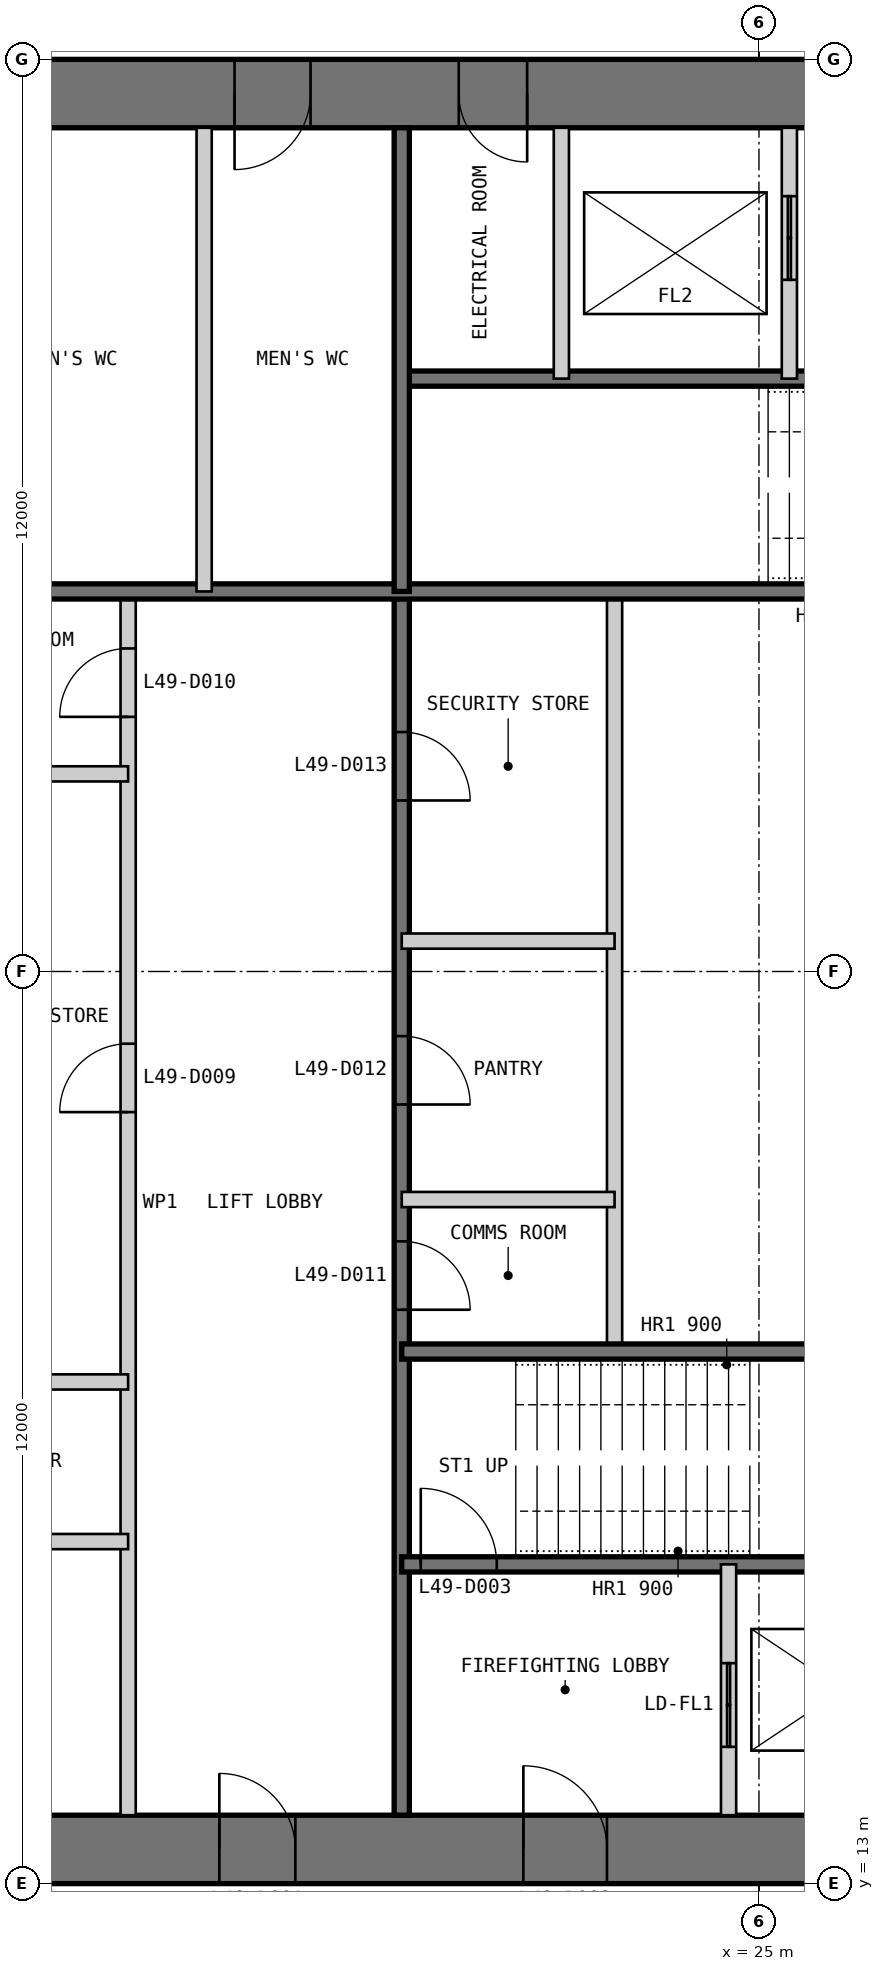
"""IFC4 building model, lengths in metres.
Left out: names, types, materials, properties, quantities, classifications, styles, units other than length and angle.
Written with IfcOpenShell. Run it as: python <this file> out.ifc"""

import sys

from ifc_helpers import new_model, si_unit, direction, frame, frame_2d, origin, place, context, subcontext, project, spatial, polyline, rectangle, outline, extrude, element, fill, save


model = new_model("IFC4")
c1 = context("Model", 3, precision=1e-05, world=origin(), true_north=direction((0.0, 1.0)))
c2 = subcontext(c1, "Body", "Model", "MODEL_VIEW")
j1 = project(units=[si_unit("LENGTHUNIT", "METRE"), si_unit("PLANEANGLEUNIT", "RADIAN")], contexts=[c1])
p1 = place(None, origin())
s1 = spatial("IfcSite", under=j1, at=p1, CompositionType="ELEMENT")
p2 = place(p1, origin())
s2 = spatial("IfcBuilding", under=s1, at=p2, CompositionType="ELEMENT")
p3 = place(p2, frame((0.0, 0.0, 209.8)))
s3 = spatial("IfcBuildingStorey", under=s2, at=p3, CompositionType="ELEMENT", Elevation=209.8)
p4 = place(p3, frame((13.0, 13.45, 0.0), z_axis=(0.0, 0.0, 1.0), x_axis=(1.0, 0.0, 0.0)))
e1 = element("IfcWall", 1, at=p4, inside=s3, PredefinedType="SHEAR", context=c2, shape_type="SweptSolid", body=[
    extrude(outline(polyline([(0.0, -0.45), (24.0, -0.45), (23.1, 0.45), (0.9, 0.45), (0.0, -0.45)])), origin(), (0.0, 0.0, 1.0), 4.0),
])
p5 = place(p4, frame((4.9, 0.0, 0.0)))
e2 = element("IfcOpeningElement", 2, at=p5, cuts=e1, PredefinedType="OPENING", context=c2, shape_type="SweptSolid", body=[
    extrude(rectangle(XDim=1.0, YDim=2.2, at=frame_2d((0.5, 1.1))), frame((0.0, 0.46, 0.0), z_axis=(0.0, -1.0, 0.0), x_axis=(1.0, 0.0, 0.0)), (0.0, 0.0, 1.0), 0.92),
])
p6 = place(p4, frame((8.9, 0.0, 0.0)))
e3 = element("IfcOpeningElement", 3, at=p6, cuts=e1, PredefinedType="OPENING", context=c2, shape_type="SweptSolid", body=[
    extrude(rectangle(XDim=1.1, YDim=2.2, at=frame_2d((0.55, 1.1))), frame((0.0, 0.46, 0.0), z_axis=(0.0, -1.0, 0.0), x_axis=(1.0, 0.0, 0.0)), (0.0, 0.0, 1.0), 0.92),
])
p7 = place(p4, frame((15.05, 0.0, 0.0)))
e4 = element("IfcOpeningElement", 4, at=p7, cuts=e1, PredefinedType="OPENING", context=c2, shape_type="SweptSolid", body=[
    extrude(rectangle(XDim=0.9, YDim=2.2, at=frame_2d((0.45, 1.1))), frame((0.0, 0.46, 0.0), z_axis=(0.0, -1.0, 0.0), x_axis=(1.0, 0.0, 0.0)), (0.0, 0.0, 1.0), 0.92),
])
p8 = place(p4, frame((17.9, 0.0, 0.0)))
e5 = element("IfcOpeningElement", 5, at=p8, cuts=e1, PredefinedType="OPENING", context=c2, shape_type="SweptSolid", body=[
    extrude(rectangle(XDim=1.0, YDim=2.2, at=frame_2d((0.5, 1.1))), frame((0.0, 0.46, 0.0), z_axis=(0.0, -1.0, 0.0), x_axis=(1.0, 0.0, 0.0)), (0.0, 0.0, 1.0), 0.92),
])
p9 = place(p4, frame((21.4, 0.0, 0.0)))
e6 = element("IfcOpeningElement", 6, at=p9, cuts=e1, PredefinedType="OPENING", context=c2, shape_type="SweptSolid", body=[
    extrude(rectangle(XDim=1.0, YDim=2.2, at=frame_2d((0.5, 1.1))), frame((0.0, 0.46, 0.0), z_axis=(0.0, -1.0, 0.0), x_axis=(1.0, 0.0, 0.0)), (0.0, 0.0, 1.0), 0.92),
])
p10 = place(p3, frame((37.0, 36.55, 0.0), z_axis=(0.0, 0.0, 1.0), x_axis=(-1.0, 0.0, 0.0)))
e7 = element("IfcWall", 7, at=p10, inside=s3, PredefinedType="SHEAR", context=c2, shape_type="SweptSolid", body=[
    extrude(outline(polyline([(0.0, -0.45), (24.0, -0.45), (23.1, 0.45), (0.9, 0.45), (0.0, -0.45)])), origin(), (0.0, 0.0, 1.0), 4.0),
])
p11 = place(p10, frame((4.9, 0.0, 0.0)))
e8 = element("IfcOpeningElement", 8, at=p11, cuts=e7, PredefinedType="OPENING", context=c2, shape_type="SweptSolid", body=[
    extrude(rectangle(XDim=1.0, YDim=2.2, at=frame_2d((0.5, 1.1))), frame((0.0, 0.46, 0.0), z_axis=(0.0, -1.0, 0.0), x_axis=(1.0, 0.0, 0.0)), (0.0, 0.0, 1.0), 0.92),
])
p12 = place(p10, frame((8.9, 0.0, 0.0)))
e9 = element("IfcOpeningElement", 9, at=p12, cuts=e7, PredefinedType="OPENING", context=c2, shape_type="SweptSolid", body=[
    extrude(rectangle(XDim=1.1, YDim=2.2, at=frame_2d((0.55, 1.1))), frame((0.0, 0.46, 0.0), z_axis=(0.0, -1.0, 0.0), x_axis=(1.0, 0.0, 0.0)), (0.0, 0.0, 1.0), 0.92),
])
p13 = place(p10, frame((15.05, 0.0, 0.0)))
e10 = element("IfcOpeningElement", 10, at=p13, cuts=e7, PredefinedType="OPENING", context=c2, shape_type="SweptSolid", body=[
    extrude(rectangle(XDim=0.9, YDim=2.2, at=frame_2d((0.45, 1.1))), frame((0.0, 0.46, 0.0), z_axis=(0.0, -1.0, 0.0), x_axis=(1.0, 0.0, 0.0)), (0.0, 0.0, 1.0), 0.92),
])
p14 = place(p10, frame((17.9, 0.0, 0.0)))
e11 = element("IfcOpeningElement", 11, at=p14, cuts=e7, PredefinedType="OPENING", context=c2, shape_type="SweptSolid", body=[
    extrude(rectangle(XDim=1.0, YDim=2.2, at=frame_2d((0.5, 1.1))), frame((0.0, 0.46, 0.0), z_axis=(0.0, -1.0, 0.0), x_axis=(1.0, 0.0, 0.0)), (0.0, 0.0, 1.0), 0.92),
])
p15 = place(p10, frame((21.4, 0.0, 0.0)))
e12 = element("IfcOpeningElement", 12, at=p15, cuts=e7, PredefinedType="OPENING", context=c2, shape_type="SweptSolid", body=[
    extrude(rectangle(XDim=1.0, YDim=2.2, at=frame_2d((0.5, 1.1))), frame((0.0, 0.46, 0.0), z_axis=(0.0, -1.0, 0.0), x_axis=(1.0, 0.0, 0.0)), (0.0, 0.0, 1.0), 0.92),
])
p16 = place(p3, frame((16.7, 13.9, 0.0), z_axis=(0.0, 0.0, 1.0), x_axis=(0.0, 1.0, 0.0)))
e13 = element("IfcWall", 13, at=p16, inside=s3, PredefinedType="PARTITIONING", context=c2, shape_type="SweptSolid", body=[
    extrude(rectangle(XDim=16.1, YDim=0.2, at=frame_2d((8.05, 0.0))), origin(), (0.0, 0.0, 1.0), 3.8),
])
p17 = place(p16, frame((9.25, 0.0, 0.0)))
e14 = element("IfcOpeningElement", 14, at=p17, cuts=e13, PredefinedType="OPENING", context=c2, shape_type="SweptSolid", body=[
    extrude(rectangle(XDim=0.9, YDim=2.2, at=frame_2d((0.45, 1.1))), frame((0.0, 0.11, 0.0), z_axis=(0.0, -1.0, 0.0), x_axis=(1.0, 0.0, 0.0)), (0.0, 0.0, 1.0), 0.22),
])
p18 = place(p16, frame((14.45, 0.0, 0.0)))
e15 = element("IfcOpeningElement", 15, at=p18, cuts=e13, PredefinedType="OPENING", context=c2, shape_type="SweptSolid", body=[
    extrude(rectangle(XDim=0.9, YDim=2.2, at=frame_2d((0.45, 1.1))), frame((0.0, 0.11, 0.0), z_axis=(0.0, -1.0, 0.0), x_axis=(1.0, 0.0, 0.0)), (0.0, 0.0, 1.0), 0.22),
])
p19 = place(p3, frame((20.3, 13.9, 0.0), z_axis=(0.0, 0.0, 1.0), x_axis=(0.0, 1.0, 0.0)))
e16 = element("IfcWall", 16, at=p19, inside=s3, PredefinedType="SOLIDWALL", context=c2, shape_type="SweptSolid", body=[
    extrude(rectangle(XDim=16.1, YDim=0.2, at=frame_2d((8.05, 0.0))), origin(), (0.0, 0.0, 1.0), 3.8),
])
p20 = place(p19, frame((6.65, 0.0, 0.0)))
e17 = element("IfcOpeningElement", 17, at=p20, cuts=e16, PredefinedType="OPENING", context=c2, shape_type="SweptSolid", body=[
    extrude(rectangle(XDim=0.9, YDim=2.2, at=frame_2d((0.45, 1.1))), frame((0.0, 0.11, 0.0), z_axis=(0.0, -1.0, 0.0), x_axis=(1.0, 0.0, 0.0)), (0.0, 0.0, 1.0), 0.22),
])
p21 = place(p19, frame((9.35, 0.0, 0.0)))
e18 = element("IfcOpeningElement", 18, at=p21, cuts=e16, PredefinedType="OPENING", context=c2, shape_type="SweptSolid", body=[
    extrude(rectangle(XDim=0.9, YDim=2.2, at=frame_2d((0.45, 1.1))), frame((0.0, 0.11, 0.0), z_axis=(0.0, -1.0, 0.0), x_axis=(1.0, 0.0, 0.0)), (0.0, 0.0, 1.0), 0.22),
])
p22 = place(p19, frame((13.35, 0.0, 0.0)))
e19 = element("IfcOpeningElement", 19, at=p22, cuts=e16, PredefinedType="OPENING", context=c2, shape_type="SweptSolid", body=[
    extrude(rectangle(XDim=0.9, YDim=2.2, at=frame_2d((0.45, 1.1))), frame((0.0, 0.11, 0.0), z_axis=(0.0, -1.0, 0.0), x_axis=(1.0, 0.0, 0.0)), (0.0, 0.0, 1.0), 0.22),
])
p23 = place(p3, frame((23.1, 20.0, 0.0), z_axis=(0.0, 0.0, 1.0), x_axis=(0.0, 1.0, 0.0)))
e20 = element("IfcWall", 20, at=p23, inside=s3, PredefinedType="PARTITIONING", context=c2, shape_type="SweptSolid", body=[
    extrude(rectangle(XDim=10.0, YDim=0.2, at=frame_2d((5.0, 0.0))), origin(), (0.0, 0.0, 1.0), 3.8),
])
p24 = place(p3, frame((20.3, 17.2, 0.0), z_axis=(0.0, 0.0, 1.0), x_axis=(1.0, 0.0, 0.0)))
e21 = element("IfcWall", 21, at=p24, inside=s3, PredefinedType="SOLIDWALL", context=c2, shape_type="SweptSolid", body=[
    extrude(rectangle(XDim=9.4, YDim=0.2, at=frame_2d((4.7, 0.0))), origin(), (0.0, 0.0, 1.0), 3.8),
])
p25 = place(p24, frame((0.25, 0.0, 0.0)))
e22 = element("IfcOpeningElement", 22, at=p25, cuts=e21, PredefinedType="OPENING", context=c2, shape_type="SweptSolid", body=[
    extrude(rectangle(XDim=1.0, YDim=2.2, at=frame_2d((0.5, 1.1))), frame((0.0, 0.11, 0.0), z_axis=(0.0, -1.0, 0.0), x_axis=(1.0, 0.0, 0.0)), (0.0, 0.0, 1.0), 0.22),
])
p26 = place(p3, frame((20.3, 20.0, 0.0), z_axis=(0.0, 0.0, 1.0), x_axis=(1.0, 0.0, 0.0)))
e23 = element("IfcWall", 23, at=p26, inside=s3, PredefinedType="SOLIDWALL", context=c2, shape_type="SweptSolid", body=[
    extrude(rectangle(XDim=15.8, YDim=0.2, at=frame_2d((7.9, 0.0))), origin(), (0.0, 0.0, 1.0), 3.8),
])
p27 = place(p3, frame((24.6, 13.9, 0.0), z_axis=(0.0, 0.0, 1.0), x_axis=(0.0, 1.0, 0.0)))
e24 = element("IfcWall", 24, at=p27, inside=s3, PredefinedType="PARTITIONING", context=c2, shape_type="SweptSolid", body=[
    extrude(rectangle(XDim=3.3, YDim=0.2, at=frame_2d((1.65, 0.0))), origin(), (0.0, 0.0, 1.0), 3.8),
])
p28 = place(p27, frame((0.9, 0.0, 0.0)))
e25 = element("IfcOpeningElement", 25, at=p28, cuts=e24, PredefinedType="OPENING", context=c2, shape_type="SweptSolid", body=[
    extrude(rectangle(XDim=1.1, YDim=2.2, at=frame_2d((0.55, 1.1))), frame((0.0, 0.11, 0.0), z_axis=(0.0, -1.0, 0.0), x_axis=(1.0, 0.0, 0.0)), (0.0, 0.0, 1.0), 0.22),
])
for number, where, z_axis, x_axis in (
    (26, (13.9, 17.5, 0.0), (0.0, 0.0, 1.0), (1.0, 0.0, 0.0)),
    (27, (13.9, 19.6, 0.0), (0.0, 0.0, 1.0), (1.0, 0.0, 0.0)),
    (28, (13.9, 27.6, 0.0), (0.0, 0.0, 1.0), (1.0, 0.0, 0.0)),
    (29, (20.3, 22.0, 0.0), (0.0, 0.0, 1.0), (1.0, 0.0, 0.0)),
    (30, (20.3, 25.4, 0.0), (0.0, 0.0, 1.0), (1.0, 0.0, 0.0)),
):
    element("IfcWall", number, at=place(p3, frame(where, z_axis=z_axis, x_axis=x_axis)), inside=s3, PredefinedType="PARTITIONING", context=c2, shape_type="SweptSolid", body=[
        extrude(rectangle(XDim=2.8, YDim=0.2, at=frame_2d((1.4, 0.0))), origin(), (0.0, 0.0, 1.0), 3.8),
    ])
p29 = place(p3, frame((29.7, 32.8, 0.0), z_axis=(0.0, 0.0, 1.0), x_axis=(-1.0, 0.0, 0.0)))
e31 = element("IfcWall", 31, at=p29, inside=s3, PredefinedType="SOLIDWALL", context=c2, shape_type="SweptSolid", body=[
    extrude(rectangle(XDim=9.4, YDim=0.2, at=frame_2d((4.7, 0.0))), origin(), (0.0, 0.0, 1.0), 3.8),
])
p30 = place(p29, frame((0.25, 0.0, 0.0)))
e32 = element("IfcOpeningElement", 32, at=p30, cuts=e31, PredefinedType="OPENING", context=c2, shape_type="SweptSolid", body=[
    extrude(rectangle(XDim=1.0, YDim=2.2, at=frame_2d((0.5, 1.1))), frame((0.0, 0.11, 0.0), z_axis=(0.0, -1.0, 0.0), x_axis=(1.0, 0.0, 0.0)), (0.0, 0.0, 1.0), 0.22),
])
p31 = place(p3, frame((29.7, 30.0, 0.0), z_axis=(0.0, 0.0, 1.0), x_axis=(-1.0, 0.0, 0.0)))
e33 = element("IfcWall", 33, at=p31, inside=s3, PredefinedType="SOLIDWALL", context=c2, shape_type="SweptSolid", body=[
    extrude(rectangle(XDim=15.8, YDim=0.2, at=frame_2d((7.9, 0.0))), origin(), (0.0, 0.0, 1.0), 3.8),
])
p32 = place(p3, frame((25.4, 36.1, 0.0), z_axis=(0.0, 0.0, 1.0), x_axis=(0.0, -1.0, 0.0)))
e34 = element("IfcWall", 34, at=p32, inside=s3, PredefinedType="PARTITIONING", context=c2, shape_type="SweptSolid", body=[
    extrude(rectangle(XDim=3.3, YDim=0.2, at=frame_2d((1.65, 0.0))), origin(), (0.0, 0.0, 1.0), 3.8),
])
p33 = place(p32, frame((0.9, 0.0, 0.0)))
e35 = element("IfcOpeningElement", 35, at=p33, cuts=e34, PredefinedType="OPENING", context=c2, shape_type="SweptSolid", body=[
    extrude(rectangle(XDim=1.1, YDim=2.2, at=frame_2d((0.55, 1.1))), frame((0.0, 0.11, 0.0), z_axis=(0.0, -1.0, 0.0), x_axis=(1.0, 0.0, 0.0)), (0.0, 0.0, 1.0), 0.22),
])
p34 = place(p3, frame((22.4, 36.1, 0.0), z_axis=(0.0, 0.0, 1.0), x_axis=(0.0, -1.0, 0.0)))
e36 = element("IfcWall", 36, at=p34, inside=s3, PredefinedType="PARTITIONING", context=c2, shape_type="SweptSolid", body=[
    extrude(rectangle(XDim=3.3, YDim=0.2, at=frame_2d((1.65, 0.0))), origin(), (0.0, 0.0, 1.0), 3.8),
])
p35 = place(p3, frame((20.3, 36.1, 0.0), z_axis=(0.0, 0.0, 1.0), x_axis=(0.0, -1.0, 0.0)))
e37 = element("IfcWall", 37, at=p35, inside=s3, PredefinedType="SOLIDWALL", context=c2, shape_type="SweptSolid", body=[
    extrude(rectangle(XDim=6.1, YDim=0.2, at=frame_2d((3.05, 0.0))), origin(), (0.0, 0.0, 1.0), 3.8),
])
p36 = place(p3, frame((17.7, 36.1, 0.0), z_axis=(0.0, 0.0, 1.0), x_axis=(0.0, -1.0, 0.0)))
e38 = element("IfcWall", 38, at=p36, inside=s3, PredefinedType="PARTITIONING", context=c2, shape_type="SweptSolid", body=[
    extrude(rectangle(XDim=6.1, YDim=0.2, at=frame_2d((3.05, 0.0))), origin(), (0.0, 0.0, 1.0), 3.8),
])
p37 = place(p5, origin())
e39 = element("IfcDoor", 39, at=p37, inside=s3, OperationType="SINGLE_SWING_LEFT", PredefinedType="DOOR", context=c2, shape_type="SweptSolid", body=[
    extrude(rectangle(XDim=1.0, YDim=2.2, at=frame_2d((0.5, 1.1))), frame((0.0, 0.025, 0.0), z_axis=(0.0, -1.0, 0.0), x_axis=(1.0, 0.0, 0.0)), (0.0, 0.0, 1.0), 0.05),
    extrude(outline(polyline([(0.0, 0.0), (0.04, 0.0), (0.04, 2.16), (0.96, 2.16), (0.96, 0.0), (1.0, 0.0), (1.0, 2.2), (0.0, 2.2), (0.0, 0.0)])), frame((0.0, 0.3, 0.0), z_axis=(0.0, -1.0, 0.0), x_axis=(1.0, 0.0, 0.0)), (0.0, 0.0, 1.0), 0.6),
])
fill(e2, e39)
p38 = place(p6, origin())
e40 = element("IfcDoor", 40, at=p38, inside=s3, OperationType="SINGLE_SWING_LEFT", PredefinedType="DOOR", context=c2, shape_type="SweptSolid", body=[
    extrude(rectangle(XDim=1.1, YDim=2.2, at=frame_2d((0.55, 1.1))), frame((0.0, 0.025, 0.0), z_axis=(0.0, -1.0, 0.0), x_axis=(1.0, 0.0, 0.0)), (0.0, 0.0, 1.0), 0.05),
    extrude(outline(polyline([(0.0, 0.0), (0.04, 0.0), (0.04, 2.16), (1.06, 2.16), (1.06, 0.0), (1.1, 0.0), (1.1, 2.2), (0.0, 2.2), (0.0, 0.0)])), frame((0.0, 0.3, 0.0), z_axis=(0.0, -1.0, 0.0), x_axis=(1.0, 0.0, 0.0)), (0.0, 0.0, 1.0), 0.6),
])
fill(e3, e40)
p39 = place(p25, origin())
e41 = element("IfcDoor", 41, at=p39, inside=s3, OperationType="SINGLE_SWING_LEFT", PredefinedType="DOOR", context=c2, shape_type="SweptSolid", body=[
    extrude(rectangle(XDim=1.0, YDim=2.2, at=frame_2d((0.5, 1.1))), frame((0.0, 0.025, 0.0), z_axis=(0.0, -1.0, 0.0), x_axis=(1.0, 0.0, 0.0)), (0.0, 0.0, 1.0), 0.05),
])
fill(e22, e41)
p40 = place(p17, origin())
e42 = element("IfcDoor", 42, at=p40, inside=s3, OperationType="SINGLE_SWING_LEFT", PredefinedType="DOOR", context=c2, shape_type="SweptSolid", body=[
    extrude(rectangle(XDim=0.9, YDim=2.2, at=frame_2d((0.45, 1.1))), frame((0.0, 0.025, 0.0), z_axis=(0.0, -1.0, 0.0), x_axis=(1.0, 0.0, 0.0)), (0.0, 0.0, 1.0), 0.05),
])
fill(e14, e42)
p41 = place(p18, origin())
e43 = element("IfcDoor", 43, at=p41, inside=s3, OperationType="SINGLE_SWING_LEFT", PredefinedType="DOOR", context=c2, shape_type="SweptSolid", body=[
    extrude(rectangle(XDim=0.9, YDim=2.2, at=frame_2d((0.45, 1.1))), frame((0.0, 0.025, 0.0), z_axis=(0.0, -1.0, 0.0), x_axis=(1.0, 0.0, 0.0)), (0.0, 0.0, 1.0), 0.05),
])
fill(e15, e43)
p42 = place(p20, frame((0.9, 0.0, 0.0), z_axis=(0.0, 0.0, 1.0), x_axis=(-1.0, 0.0, 0.0)))
e44 = element("IfcDoor", 44, at=p42, inside=s3, OperationType="SINGLE_SWING_RIGHT", PredefinedType="DOOR", context=c2, shape_type="SweptSolid", body=[
    extrude(rectangle(XDim=0.9, YDim=2.2, at=frame_2d((0.45, 1.1))), frame((0.0, 0.025, 0.0), z_axis=(0.0, -1.0, 0.0), x_axis=(1.0, 0.0, 0.0)), (0.0, 0.0, 1.0), 0.05),
])
fill(e17, e44)
p43 = place(p21, frame((0.9, 0.0, 0.0), z_axis=(0.0, 0.0, 1.0), x_axis=(-1.0, 0.0, 0.0)))
e45 = element("IfcDoor", 45, at=p43, inside=s3, OperationType="SINGLE_SWING_RIGHT", PredefinedType="DOOR", context=c2, shape_type="SweptSolid", body=[
    extrude(rectangle(XDim=0.9, YDim=2.2, at=frame_2d((0.45, 1.1))), frame((0.0, 0.025, 0.0), z_axis=(0.0, -1.0, 0.0), x_axis=(1.0, 0.0, 0.0)), (0.0, 0.0, 1.0), 0.05),
])
fill(e18, e45)
p44 = place(p22, frame((0.9, 0.0, 0.0), z_axis=(0.0, 0.0, 1.0), x_axis=(-1.0, 0.0, 0.0)))
e46 = element("IfcDoor", 46, at=p44, inside=s3, OperationType="SINGLE_SWING_RIGHT", PredefinedType="DOOR", context=c2, shape_type="SweptSolid", body=[
    extrude(rectangle(XDim=0.9, YDim=2.2, at=frame_2d((0.45, 1.1))), frame((0.0, 0.025, 0.0), z_axis=(0.0, -1.0, 0.0), x_axis=(1.0, 0.0, 0.0)), (0.0, 0.0, 1.0), 0.05),
])
fill(e19, e46)
p45 = place(p13, origin())
e47 = element("IfcDoor", 47, at=p45, inside=s3, OperationType="SINGLE_SWING_LEFT", PredefinedType="DOOR", context=c2, shape_type="SweptSolid", body=[
    extrude(rectangle(XDim=0.9, YDim=2.2, at=frame_2d((0.45, 1.1))), frame((0.0, 0.025, 0.0), z_axis=(0.0, -1.0, 0.0), x_axis=(1.0, 0.0, 0.0)), (0.0, 0.0, 1.0), 0.05),
    extrude(outline(polyline([(0.0, 0.0), (0.04, 0.0), (0.04, 2.16), (0.86, 2.16), (0.86, 0.0), (0.9, 0.0), (0.9, 2.2), (0.0, 2.2), (0.0, 0.0)])), frame((0.0, 0.3, 0.0), z_axis=(0.0, -1.0, 0.0), x_axis=(1.0, 0.0, 0.0)), (0.0, 0.0, 1.0), 0.6),
])
fill(e10, e47)
p46 = place(p14, origin())
e48 = element("IfcDoor", 48, at=p46, inside=s3, OperationType="SINGLE_SWING_RIGHT", PredefinedType="DOOR", context=c2, shape_type="SweptSolid", body=[
    extrude(rectangle(XDim=1.0, YDim=2.2, at=frame_2d((0.5, 1.1))), frame((0.0, 0.025, 0.0), z_axis=(0.0, -1.0, 0.0), x_axis=(1.0, 0.0, 0.0)), (0.0, 0.0, 1.0), 0.05),
    extrude(outline(polyline([(0.0, 0.0), (0.04, 0.0), (0.04, 2.16), (0.96, 2.16), (0.96, 0.0), (1.0, 0.0), (1.0, 2.2), (0.0, 2.2), (0.0, 0.0)])), frame((0.0, 0.3, 0.0), z_axis=(0.0, -1.0, 0.0), x_axis=(1.0, 0.0, 0.0)), (0.0, 0.0, 1.0), 0.6),
])
fill(e11, e48)
p47 = place(p28, origin())
e49 = element("IfcDoor", 49, at=p47, inside=s3, OperationType="DOUBLE_DOOR_SLIDING", PredefinedType="DOOR", context=c2, shape_type="SweptSolid", body=[
    extrude(rectangle(XDim=1.1, YDim=2.2, at=frame_2d((0.55, 1.1))), frame((0.0, 0.025, 0.0), z_axis=(0.0, -1.0, 0.0), x_axis=(1.0, 0.0, 0.0)), (0.0, 0.0, 1.0), 0.05),
])
fill(e25, e49)
p48 = place(p33, origin())
e50 = element("IfcDoor", 50, at=p48, inside=s3, OperationType="DOUBLE_DOOR_SLIDING", PredefinedType="DOOR", context=c2, shape_type="SweptSolid", body=[
    extrude(rectangle(XDim=1.1, YDim=2.2, at=frame_2d((0.55, 1.1))), frame((0.0, 0.025, 0.0), z_axis=(0.0, -1.0, 0.0), x_axis=(1.0, 0.0, 0.0)), (0.0, 0.0, 1.0), 0.05),
])
fill(e35, e50)
save(model, sys.argv[1])
